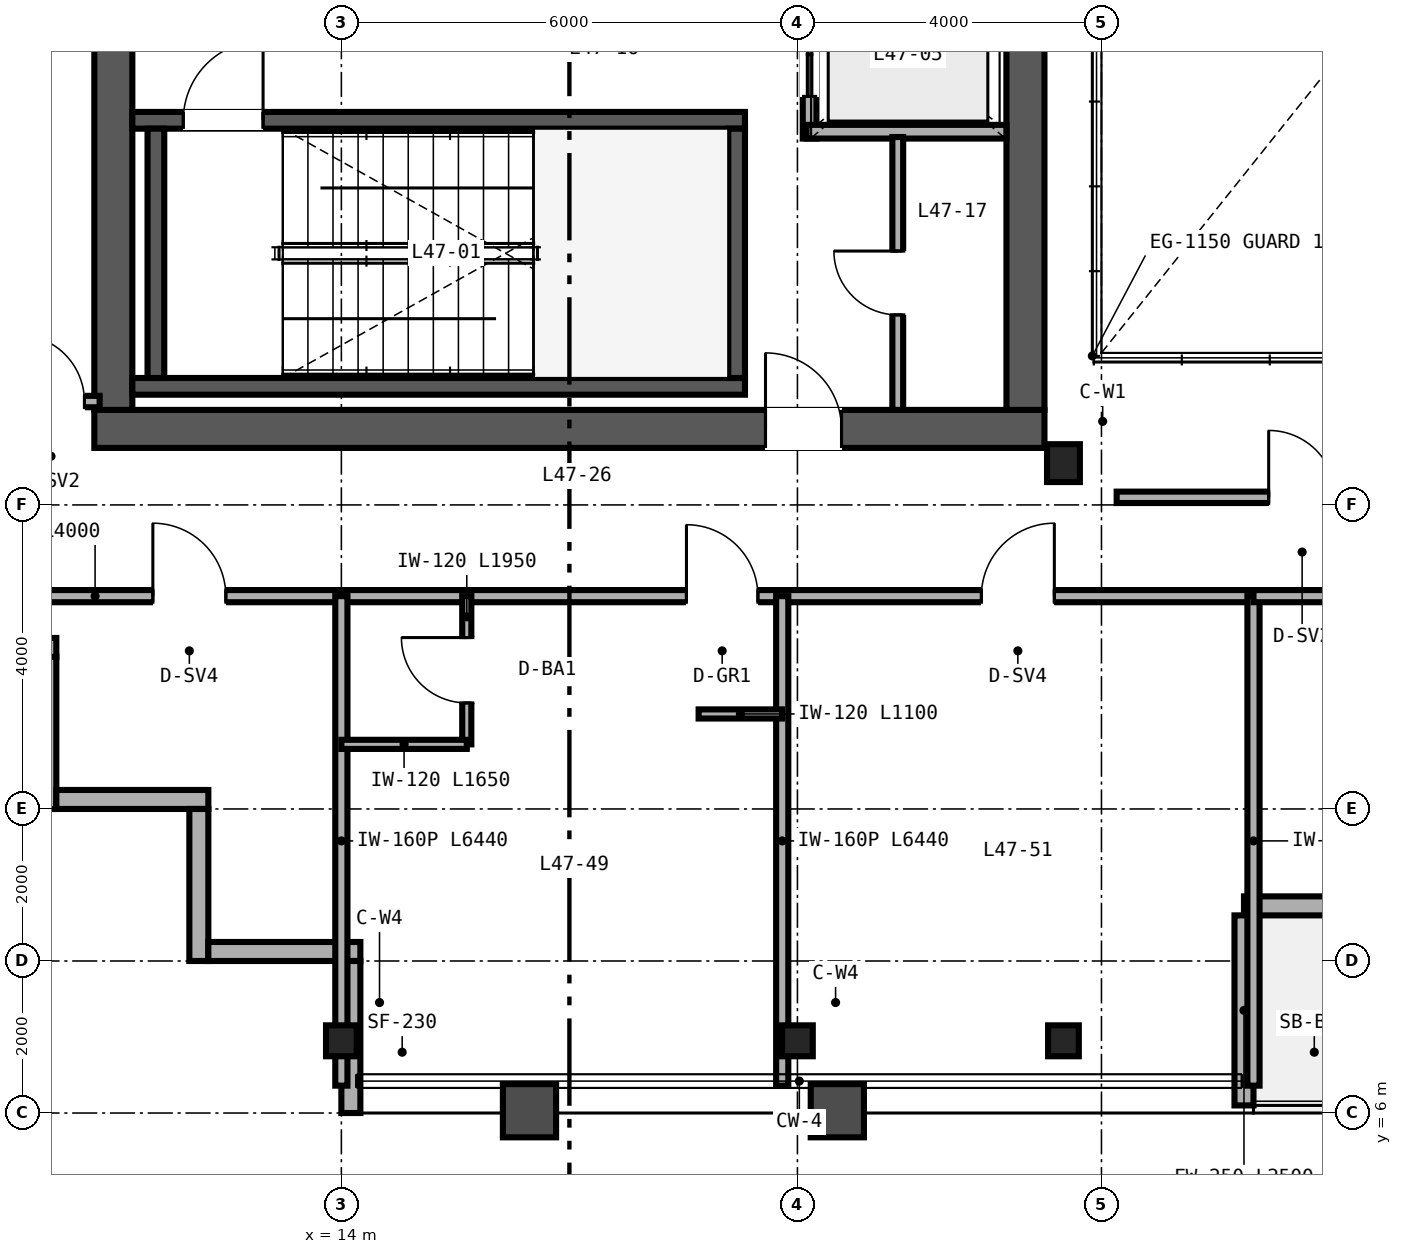
"""IFC4 building model, lengths in metres.
Left out: names, types, materials, properties, quantities, classifications, styles, units other than length and angle.
Written with IfcOpenShell. Run it as: python <this file> out.ifc"""

import sys

from ifc_helpers import new_model, si_unit, direction, frame, frame_2d, origin, origin_2d, place, context, subcontext, project, spatial, rectangle, i_section, extrude, source, transform, mapped, element, fill, save


model = new_model("IFC4")
c1 = context("Model", 3, precision=1e-05, world=origin(), true_north=direction((0.0, 1.0)))
c2 = subcontext(c1, "Body", "Model", "MODEL_VIEW")
j1 = project(units=[si_unit("LENGTHUNIT", "METRE"), si_unit("PLANEANGLEUNIT", "RADIAN")], contexts=[c1])
p1 = place(None, origin())
s1 = spatial("IfcSite", under=j1, at=p1, CompositionType="ELEMENT")
p2 = place(p1, origin())
s2 = spatial("IfcBuilding", under=s1, at=p2, CompositionType="ELEMENT")
p3 = place(p2, frame((0.0, 0.0, 188.4)))
s3 = spatial("IfcBuildingStorey", under=s2, at=p3, CompositionType="ELEMENT", Elevation=188.4)
p4 = place(p3, frame((10.75, 15.0, 0.0), z_axis=(0.0, 0.0, 1.0), x_axis=(1.0, 0.0, 0.0)))
e1 = element("IfcWall", 1, at=p4, inside=s3, PredefinedType="SHEAR", context=c2, shape_type="SweptSolid", body=[
    extrude(rectangle(XDim=12.5, YDim=0.5, at=frame_2d((6.25, 0.0))), origin(), (0.0, 0.0, 1.0), 3.37),
])
p5 = place(p4, frame((8.83, 0.0, 0.0)))
e2 = element("IfcOpeningElement", 2, at=p5, cuts=e1, PredefinedType="OPENING", context=c2, shape_type="SweptSolid", body=[
    extrude(rectangle(XDim=1.0, YDim=2.15, at=frame_2d((0.5, 1.075))), frame((0.0, 0.26, 0.0), z_axis=(0.0, -1.0, 0.0), x_axis=(1.0, 0.0, 0.0)), (0.0, 0.0, 1.0), 0.52),
])
for number, where, z_axis, x_axis in (
    (3, (11.0, 15.25, 0.0), (0.0, 0.0, 1.0), (0.0, 1.0, 0.0)),
    (4, (23.0, 15.25, 0.0), (0.0, 0.0, 1.0), (0.0, 1.0, 0.0)),
):
    element("IfcWall", number, at=place(p3, frame(where, z_axis=z_axis, x_axis=x_axis)), inside=s3, PredefinedType="SHEAR", context=c2, shape_type="SweptSolid", body=[
        extrude(rectangle(XDim=21.5, YDim=0.5, at=frame_2d((10.75, 0.0))), origin(), (0.0, 0.0, 1.0), 3.37),
    ])
p6 = place(p3, frame((11.25, 15.56, 0.0), z_axis=(0.0, 0.0, 1.0), x_axis=(1.0, 0.0, 0.0)))
e5 = element("IfcWall", 5, at=p6, inside=s3, PredefinedType="SHEAR", context=c2, shape_type="SweptSolid", body=[
    extrude(rectangle(XDim=8.06, YDim=0.22, at=frame_2d((4.03, 0.0))), origin(), (0.0, 0.0, 1.0), 3.4),
])
p7 = place(p3, frame((11.25, 19.06, 0.0), z_axis=(0.0, 0.0, 1.0), x_axis=(1.0, 0.0, 0.0)))
e6 = element("IfcWall", 6, at=p7, inside=s3, PredefinedType="SHEAR", context=c2, shape_type="SweptSolid", body=[
    extrude(rectangle(XDim=8.06, YDim=0.22, at=frame_2d((4.03, 0.0))), origin(), (0.0, 0.0, 1.0), 3.4),
])
p8 = place(p7, frame((0.67, 0.0, 0.0)))
e7 = element("IfcOpeningElement", 7, at=p8, cuts=e6, PredefinedType="OPENING", context=c2, shape_type="SweptSolid", body=[
    extrude(rectangle(XDim=1.05, YDim=2.15, at=frame_2d((0.525, 1.075))), frame((0.0, 0.12, 0.0), z_axis=(0.0, -1.0, 0.0), x_axis=(1.0, 0.0, 0.0)), (0.0, 0.0, 1.0), 0.24),
])
for number, where, z_axis, x_axis in (
    (8, (11.56, 15.67, 0.0), (0.0, 0.0, 1.0), (0.0, 1.0, 0.0)),
    (9, (19.2, 15.67, 0.0), (0.0, 0.0, 1.0), (0.0, 1.0, 0.0)),
):
    element("IfcWall", number, at=place(p3, frame(where, z_axis=z_axis, x_axis=x_axis)), inside=s3, PredefinedType="SHEAR", context=c2, shape_type="SweptSolid", body=[
        extrude(rectangle(XDim=3.28, YDim=0.22, at=frame_2d((1.64, 0.0))), origin(), (0.0, 0.0, 1.0), 3.4),
    ])
m1 = source(origin(), c2, "Body", "SweptSolid", [
    extrude(i_section(OverallWidth=0.432, OverallDepth=0.498, WebThickness=0.056, FlangeThickness=0.089, FilletRadius=0.025, at=origin_2d()), origin(), (0.0, 0.0, 1.0), 3.37),
])
p9 = place(p3, frame((23.5, 14.55, 0.0), z_axis=(0.0, 0.0, 1.0), x_axis=(1.0, 0.0, 0.0)))
e10 = element("IfcColumn", 10, at=p9, inside=s3, PredefinedType="COLUMN", context=c2, shape_type="MappedRepresentation", body=[
    mapped(m1, transform((0.0, 0.0, 0.0), scale=1.0)),
])
m2 = source(origin(), c2, "Body", "SweptSolid", [
    extrude(i_section(OverallWidth=0.404, OverallDepth=0.407, WebThickness=0.027, FlangeThickness=0.044, FilletRadius=0.025, at=origin_2d()), origin(), (0.0, 0.0, 1.0), 3.37),
])
for number, where, z_axis, x_axis in (
    (11, (14.0, 6.95, 0.0), (0.0, 0.0, 1.0), (1.0, 0.0, 0.0)),
    (12, (20.0, 6.95, 0.0), (0.0, 0.0, 1.0), (1.0, 0.0, 0.0)),
    (13, (23.5, 6.95, 0.0), (0.0, 0.0, 1.0), (1.0, 0.0, 0.0)),
):
    element("IfcColumn", number, at=place(p3, frame(where, z_axis=z_axis, x_axis=x_axis)), inside=s3, PredefinedType="COLUMN", context=c2, shape_type="MappedRepresentation", body=[
        mapped(m2, transform((0.0, 0.0, 0.0), scale=1.0)),
    ])
p10 = place(p3, frame((8.0, 12.125, 0.0), z_axis=(0.0, 0.0, 1.0), x_axis=(1.0, 0.0, 0.0)))
e14 = element("IfcWall", 14, at=p10, inside=s3, PredefinedType="SOLIDWALL", context=c2, shape_type="SweptSolid", body=[
    extrude(rectangle(XDim=2.25, YDim=0.25, at=frame_2d((1.125, 0.0))), origin(), (0.0, 0.0, 1.0), 3.37),
])
for number, where, z_axis, x_axis in (
    (15, (10.125, 12.0, 0.0), (0.0, 0.0, 1.0), (0.0, -1.0, 0.0)),
    (16, (10.25, 10.125, 0.0), (0.0, 0.0, 1.0), (1.0, 0.0, 0.0)),
    (17, (12.125, 10.0, 0.0), (0.0, 0.0, 1.0), (0.0, -1.0, 0.0)),
    (18, (12.25, 8.125, 0.0), (0.0, 0.0, 1.0), (1.0, 0.0, 0.0)),
):
    element("IfcWall", number, at=place(p3, frame(where, z_axis=z_axis, x_axis=x_axis)), inside=s3, PredefinedType="SOLIDWALL", context=c2, shape_type="SweptSolid", body=[
        extrude(rectangle(XDim=2.0, YDim=0.25, at=frame_2d((1.0, 0.0))), origin(), (0.0, 0.0, 1.0), 3.37),
    ])
p11 = place(p3, frame((14.125, 8.0, 0.0), z_axis=(0.0, 0.0, 1.0), x_axis=(0.0, -1.0, 0.0)))
e19 = element("IfcWall", 19, at=p11, inside=s3, PredefinedType="SOLIDWALL", context=c2, shape_type="SweptSolid", body=[
    extrude(rectangle(XDim=2.0, YDim=0.25, at=frame_2d((1.0, 0.0))), origin(), (0.0, 0.0, 1.0), 2.677),
])
p12 = place(p3, frame((25.875, 8.725, 0.0), z_axis=(0.0, 0.0, 1.0), x_axis=(1.0, 0.0, 0.0)))
e20 = element("IfcWall", 20, at=p12, inside=s3, PredefinedType="SOLIDWALL", context=c2, shape_type="SweptSolid", body=[
    extrude(rectangle(XDim=12.25, YDim=0.25, at=frame_2d((6.125, 0.0))), origin(), (0.0, 0.0, 1.0), 3.37),
])
p13 = place(p12, frame((5.6, 0.0, 0.0)))
e21 = element("IfcOpeningElement", 21, at=p13, cuts=e20, PredefinedType="OPENING", context=c2, shape_type="SweptSolid", body=[
    extrude(rectangle(XDim=1.05, YDim=2.15, at=frame_2d((0.525, 1.075))), frame((0.0, 0.135, 0.0), z_axis=(0.0, -1.0, 0.0), x_axis=(1.0, 0.0, 0.0)), (0.0, 0.0, 1.0), 0.27),
])
p14 = place(p3, frame((25.875, 6.1, 0.0), z_axis=(0.0, 0.0, 1.0), x_axis=(0.0, 1.0, 0.0)))
e22 = element("IfcWall", 22, at=p14, inside=s3, PredefinedType="SOLIDWALL", context=c2, shape_type="SweptSolid", body=[
    extrude(rectangle(XDim=2.5, YDim=0.25, at=frame_2d((1.25, 0.0))), origin(), (0.0, 0.0, 1.0), 2.443),
])
p15 = place(p3, frame((20.16, 18.82, 0.0), z_axis=(0.0, 0.0, 1.0), x_axis=(0.0, 1.0, 0.0)))
e23 = element("IfcWall", 23, at=p15, inside=s3, PredefinedType="SOLIDWALL", context=c2, shape_type="SweptSolid", body=[
    extrude(rectangle(XDim=6.32, YDim=0.18, at=frame_2d((3.16, 0.0))), origin(), (0.0, 0.0, 1.0), 2.47),
])
p16 = place(p15, frame((0.555, 0.0, 0.0)))
e24 = element("IfcOpeningElement", 24, at=p16, cuts=e23, PredefinedType="OPENING", context=c2, shape_type="SweptSolid", body=[
    extrude(rectangle(XDim=1.1, YDim=2.2, at=frame_2d((0.55, 1.1))), frame((0.0, 0.1, 0.0), z_axis=(0.0, -1.0, 0.0), x_axis=(1.0, 0.0, 0.0)), (0.0, 0.0, 1.0), 0.2),
])
p17 = place(p15, frame((2.635, 0.0, 0.0)))
e25 = element("IfcOpeningElement", 25, at=p17, cuts=e23, PredefinedType="OPENING", context=c2, shape_type="SweptSolid", body=[
    extrude(rectangle(XDim=1.1, YDim=2.2, at=frame_2d((0.55, 1.1))), frame((0.0, 0.1, 0.0), z_axis=(0.0, -1.0, 0.0), x_axis=(1.0, 0.0, 0.0)), (0.0, 0.0, 1.0), 0.2),
])
p18 = place(p15, frame((4.69, 0.0, 0.0)))
e26 = element("IfcOpeningElement", 26, at=p18, cuts=e23, PredefinedType="OPENING", context=c2, shape_type="SweptSolid", body=[
    extrude(rectangle(XDim=1.1, YDim=2.2, at=frame_2d((0.55, 1.1))), frame((0.0, 0.1, 0.0), z_axis=(0.0, -1.0, 0.0), x_axis=(1.0, 0.0, 0.0)), (0.0, 0.0, 1.0), 0.2),
])
p19 = place(p3, frame((20.12, 18.91, 0.0), z_axis=(0.0, 0.0, 1.0), x_axis=(1.0, 0.0, 0.0)))
e27 = element("IfcWall", 27, at=p19, inside=s3, PredefinedType="SOLIDWALL", context=c2, shape_type="SweptSolid", body=[
    extrude(rectangle(XDim=2.63, YDim=0.18, at=frame_2d((1.315, 0.0))), origin(), (0.0, 0.0, 1.0), 3.37),
])
p20 = place(p3, frame((21.32, 15.25, 0.0), z_axis=(0.0, 0.0, 1.0), x_axis=(0.0, 1.0, 0.0)))
e28 = element("IfcWall", 28, at=p20, inside=s3, PredefinedType="PARTITIONING", context=c2, shape_type="SweptSolid", body=[
    extrude(rectangle(XDim=3.59, YDim=0.142, at=frame_2d((1.795, 0.0))), origin(), (0.0, 0.0, 1.0), 3.37),
])
p21 = place(p20, frame((1.25, 0.0, 0.0)))
e29 = element("IfcOpeningElement", 29, at=p21, cuts=e28, PredefinedType="OPENING", context=c2, shape_type="SweptSolid", body=[
    extrude(rectangle(XDim=0.84, YDim=2.1, at=frame_2d((0.42, 1.05))), frame((0.0, 0.081, 0.0), z_axis=(0.0, -1.0, 0.0), x_axis=(1.0, 0.0, 0.0)), (0.0, 0.0, 1.0), 0.162),
])
p22 = place(p3, frame((24.2, 14.1, 0.0), z_axis=(0.0, 0.0, 1.0), x_axis=(1.0, 0.0, 0.0)))
e30 = element("IfcWall", 30, at=p22, inside=s3, PredefinedType="PARTITIONING", context=c2, shape_type="SweptSolid", body=[
    extrude(rectangle(XDim=15.6, YDim=0.15, at=frame_2d((7.8, 0.0))), origin(), (0.0, 0.0, 1.0), 3.37),
])
p23 = place(p22, frame((2.0, 0.0, 0.0)))
e31 = element("IfcOpeningElement", 31, at=p23, cuts=e30, PredefinedType="OPENING", context=c2, shape_type="SweptSolid", body=[
    extrude(rectangle(XDim=0.88, YDim=2.15, at=frame_2d((0.44, 1.075))), frame((0.0, 0.085, 0.0), z_axis=(0.0, -1.0, 0.0), x_axis=(1.0, 0.0, 0.0)), (0.0, 0.0, 1.0), 0.17),
])
p24 = place(p22, frame((7.25, 0.0, 0.0)))
e32 = element("IfcOpeningElement", 32, at=p24, cuts=e30, PredefinedType="OPENING", context=c2, shape_type="SweptSolid", body=[
    extrude(rectangle(XDim=0.88, YDim=2.15, at=frame_2d((0.44, 1.075))), frame((0.0, 0.085, 0.0), z_axis=(0.0, -1.0, 0.0), x_axis=(1.0, 0.0, 0.0)), (0.0, 0.0, 1.0), 0.17),
])
p25 = place(p22, frame((12.5, 0.0, 0.0)))
e33 = element("IfcOpeningElement", 33, at=p25, cuts=e30, PredefinedType="OPENING", context=c2, shape_type="SweptSolid", body=[
    extrude(rectangle(XDim=0.88, YDim=2.15, at=frame_2d((0.44, 1.075))), frame((0.0, 0.085, 0.0), z_axis=(0.0, -1.0, 0.0), x_axis=(1.0, 0.0, 0.0)), (0.0, 0.0, 1.0), 0.17),
])
p26 = place(p3, frame((8.16, 15.36, 0.0), z_axis=(0.0, 0.0, 1.0), x_axis=(1.0, 0.0, 0.0)))
e34 = element("IfcWall", 34, at=p26, inside=s3, PredefinedType="PARTITIONING", context=c2, shape_type="SweptSolid", body=[
    extrude(rectangle(XDim=2.66, YDim=0.15, at=frame_2d((1.33, 0.0))), origin(), (0.0, 0.0, 1.0), 2.591),
])
p27 = place(p26, frame((1.58, 0.0, 0.0)))
e35 = element("IfcOpeningElement", 35, at=p27, cuts=e34, PredefinedType="OPENING", context=c2, shape_type="SweptSolid", body=[
    extrude(rectangle(XDim=0.88, YDim=2.15, at=frame_2d((0.44, 1.075))), frame((0.0, 0.085, 0.0), z_axis=(0.0, -1.0, 0.0), x_axis=(1.0, 0.0, 0.0)), (0.0, 0.0, 1.0), 0.17),
])
p28 = place(p3, frame((10.0, 12.8, 0.0), z_axis=(0.0, 0.0, 1.0), x_axis=(1.0, 0.0, 0.0)))
e36 = element("IfcWall", 36, at=p28, inside=s3, PredefinedType="PARTITIONING", context=c2, shape_type="SweptSolid", body=[
    extrude(rectangle(XDim=4.0, YDim=0.16, at=frame_2d((2.0, 0.0))), origin(), (0.0, 0.0, 1.0), 3.37),
])
p29 = place(p28, frame((1.52, 0.0, 0.0)))
e37 = element("IfcOpeningElement", 37, at=p29, cuts=e36, PredefinedType="OPENING", context=c2, shape_type="SweptSolid", body=[
    extrude(rectangle(XDim=0.96, YDim=2.15, at=frame_2d((0.48, 1.075))), frame((0.0, 0.09, 0.0), z_axis=(0.0, -1.0, 0.0), x_axis=(1.0, 0.0, 0.0)), (0.0, 0.0, 1.0), 0.18),
])
p30 = place(p3, frame((14.0, 12.8, 0.0), z_axis=(0.0, 0.0, 1.0), x_axis=(1.0, 0.0, 0.0)))
e38 = element("IfcWall", 38, at=p30, inside=s3, PredefinedType="PARTITIONING", context=c2, shape_type="SweptSolid", body=[
    extrude(rectangle(XDim=12.0, YDim=0.16, at=frame_2d((6.0, 0.0))), origin(), (0.0, 0.0, 1.0), 2.913),
])
p31 = place(p30, frame((4.54, 0.0, 0.0)))
e39 = element("IfcOpeningElement", 39, at=p31, cuts=e38, PredefinedType="OPENING", context=c2, shape_type="SweptSolid", body=[
    extrude(rectangle(XDim=0.94, YDim=2.15, at=frame_2d((0.47, 1.075))), frame((0.0, 0.09, 0.0), z_axis=(0.0, -1.0, 0.0), x_axis=(1.0, 0.0, 0.0)), (0.0, 0.0, 1.0), 0.18),
])
p32 = place(p30, frame((8.42, 0.0, 0.0)))
e40 = element("IfcOpeningElement", 40, at=p32, cuts=e38, PredefinedType="OPENING", context=c2, shape_type="SweptSolid", body=[
    extrude(rectangle(XDim=0.96, YDim=2.15, at=frame_2d((0.48, 1.075))), frame((0.0, 0.09, 0.0), z_axis=(0.0, -1.0, 0.0), x_axis=(1.0, 0.0, 0.0)), (0.0, 0.0, 1.0), 0.18),
])
p33 = place(p3, frame((14.0, 6.36, 0.0), z_axis=(0.0, 0.0, 1.0), x_axis=(0.0, 1.0, 0.0)))
e41 = element("IfcWall", 41, at=p33, inside=s3, PredefinedType="PARTITIONING", context=c2, shape_type="SweptSolid", body=[
    extrude(rectangle(XDim=6.44, YDim=0.16, at=frame_2d((3.22, 0.0))), origin(), (0.0, 0.0, 1.0), 2.677),
])
p34 = place(p3, frame((26.0, 6.36, 0.0), z_axis=(0.0, 0.0, 1.0), x_axis=(0.0, 1.0, 0.0)))
e42 = element("IfcWall", 42, at=p34, inside=s3, PredefinedType="PARTITIONING", context=c2, shape_type="SweptSolid", body=[
    extrude(rectangle(XDim=6.44, YDim=0.16, at=frame_2d((3.22, 0.0))), origin(), (0.0, 0.0, 1.0), 2.443),
])
p35 = place(p3, frame((19.8, 6.36, 0.0), z_axis=(0.0, 0.0, 1.0), x_axis=(0.0, 1.0, 0.0)))
e43 = element("IfcWall", 43, at=p35, inside=s3, PredefinedType="PARTITIONING", context=c2, shape_type="SweptSolid", body=[
    extrude(rectangle(XDim=6.44, YDim=0.16, at=frame_2d((3.22, 0.0))), origin(), (0.0, 0.0, 1.0), 2.677),
])
p36 = place(p3, frame((15.65, 10.85, 0.0), z_axis=(0.0, 0.0, 1.0), x_axis=(0.0, 1.0, 0.0)))
e44 = element("IfcWall", 44, at=p36, inside=s3, PredefinedType="PARTITIONING", context=c2, shape_type="SweptSolid", body=[
    extrude(rectangle(XDim=1.95, YDim=0.12, at=frame_2d((0.975, 0.0))), origin(), (0.0, 0.0, 1.0), 3.37),
])
p37 = place(p36, frame((0.545, 0.0, 0.0)))
e45 = element("IfcOpeningElement", 45, at=p37, cuts=e44, PredefinedType="OPENING", context=c2, shape_type="SweptSolid", body=[
    extrude(rectangle(XDim=0.86, YDim=2.1, at=frame_2d((0.43, 1.05))), frame((0.0, 0.07, 0.0), z_axis=(0.0, -1.0, 0.0), x_axis=(1.0, 0.0, 0.0)), (0.0, 0.0, 1.0), 0.14),
])
p38 = place(p3, frame((14.0, 10.85, 0.0), z_axis=(0.0, 0.0, 1.0), x_axis=(1.0, 0.0, 0.0)))
e46 = element("IfcWall", 46, at=p38, inside=s3, PredefinedType="PARTITIONING", context=c2, shape_type="SweptSolid", body=[
    extrude(rectangle(XDim=1.65, YDim=0.12, at=frame_2d((0.825, 0.0))), origin(), (0.0, 0.0, 1.0), 3.37),
])
p39 = place(p3, frame((18.7, 11.25, 0.0), z_axis=(0.0, 0.0, 1.0), x_axis=(1.0, 0.0, 0.0)))
e47 = element("IfcWall", 47, at=p39, inside=s3, PredefinedType="PARTITIONING", context=c2, shape_type="SweptSolid", body=[
    extrude(rectangle(XDim=1.1, YDim=0.12, at=frame_2d((0.55, 0.0))), origin(), (0.0, 0.0, 1.0), 3.37),
])
p40 = place(p3, frame((26.0, 12.8, 0.0), z_axis=(0.0, 0.0, 1.0), x_axis=(1.0, 0.0, 0.0)))
e48 = element("IfcWall", 48, at=p40, inside=s3, PredefinedType="PARTITIONING", context=c2, shape_type="SweptSolid", body=[
    extrude(rectangle(XDim=12.0, YDim=0.16, at=frame_2d((6.0, 0.0))), origin(), (0.0, 0.0, 1.0), 3.37),
])
p41 = place(p40, frame((5.2, 0.0, 0.0)))
e49 = element("IfcOpeningElement", 49, at=p41, cuts=e48, PredefinedType="OPENING", context=c2, shape_type="SweptSolid", body=[
    extrude(rectangle(XDim=0.96, YDim=2.15, at=frame_2d((0.48, 1.075))), frame((0.0, 0.09, 0.0), z_axis=(0.0, -1.0, 0.0), x_axis=(1.0, 0.0, 0.0)), (0.0, 0.0, 1.0), 0.18),
])
m3 = source(origin(), c2, "Body", "SweptSolid", [
    extrude(rectangle(XDim=1.05, YDim=2.15, at=frame_2d((0.525, 1.075))), frame((0.0, 0.025, 0.0), z_axis=(0.0, -1.0, 0.0), x_axis=(1.0, 0.0, 0.0)), (0.0, 0.0, 1.0), 0.05),
])
p42 = place(p8, origin())
e50 = element("IfcDoor", 50, at=p42, inside=s3, OperationType="SINGLE_SWING_RIGHT", PredefinedType="DOOR", context=c2, shape_type="MappedRepresentation", body=[
    mapped(m3, transform((0.0, 0.0, 0.0), scale=1.0)),
])
fill(e7, e50)
m4 = source(origin(), c2, "Body", "SweptSolid", [
    extrude(rectangle(XDim=1.1, YDim=2.2, at=frame_2d((0.55, 1.1))), frame((0.0, 0.025, 0.0), z_axis=(0.0, -1.0, 0.0), x_axis=(1.0, 0.0, 0.0)), (0.0, 0.0, 1.0), 0.05),
])
p43 = place(p16, origin())
e51 = element("IfcDoor", 51, at=p43, inside=s3, OperationType="DOUBLE_DOOR_SLIDING", PredefinedType="DOOR", context=c2, shape_type="MappedRepresentation", body=[
    mapped(m4, transform((0.0, 0.0, 0.0), scale=1.0)),
])
fill(e24, e51)
m5 = source(origin(), c2, "Body", "SweptSolid", [
    extrude(rectangle(XDim=0.84, YDim=2.1, at=frame_2d((0.42, 1.05))), frame((0.0, 0.025, 0.0), z_axis=(0.0, -1.0, 0.0), x_axis=(1.0, 0.0, 0.0)), (0.0, 0.0, 1.0), 0.05),
])
p44 = place(p21, origin())
e52 = element("IfcDoor", 52, at=p44, inside=s3, OperationType="SINGLE_SWING_RIGHT", PredefinedType="DOOR", context=c2, shape_type="MappedRepresentation", body=[
    mapped(m5, transform((0.0, 0.0, 0.0), scale=1.0)),
])
fill(e29, e52)
m6 = source(origin(), c2, "Body", "SweptSolid", [
    extrude(rectangle(XDim=1.0, YDim=2.15, at=frame_2d((0.5, 1.075))), frame((0.0, 0.025, 0.0), z_axis=(0.0, -1.0, 0.0), x_axis=(1.0, 0.0, 0.0)), (0.0, 0.0, 1.0), 0.05),
])
p45 = place(p5, origin())
e53 = element("IfcDoor", 53, at=p45, inside=s3, OperationType="SINGLE_SWING_LEFT", PredefinedType="DOOR", context=c2, shape_type="MappedRepresentation", body=[
    mapped(m6, transform((0.0, 0.0, 0.0), scale=1.0)),
])
fill(e2, e53)
m7 = source(origin(), c2, "Body", "SweptSolid", [
    extrude(rectangle(XDim=0.88, YDim=2.15, at=frame_2d((0.44, 1.075))), frame((0.0, 0.025, 0.0), z_axis=(0.0, -1.0, 0.0), x_axis=(1.0, 0.0, 0.0)), (0.0, 0.0, 1.0), 0.05),
])
p46 = place(p23, origin())
e54 = element("IfcDoor", 54, at=p46, inside=s3, OperationType="SINGLE_SWING_LEFT", PredefinedType="DOOR", context=c2, shape_type="MappedRepresentation", body=[
    mapped(m7, transform((0.0, 0.0, 0.0), scale=1.0)),
])
fill(e31, e54)
p47 = place(p27, origin())
e55 = element("IfcDoor", 55, at=p47, inside=s3, OperationType="SINGLE_SWING_LEFT", PredefinedType="DOOR", context=c2, shape_type="MappedRepresentation", body=[
    mapped(m7, transform((0.0, 0.0, 0.0), scale=1.0)),
])
fill(e35, e55)
m8 = source(origin(), c2, "Body", "SweptSolid", [
    extrude(rectangle(XDim=0.96, YDim=2.15, at=frame_2d((0.48, 1.075))), frame((0.0, 0.025, 0.0), z_axis=(0.0, -1.0, 0.0), x_axis=(1.0, 0.0, 0.0)), (0.0, 0.0, 1.0), 0.05),
])
p48 = place(p29, origin())
e56 = element("IfcDoor", 56, at=p48, inside=s3, OperationType="SINGLE_SWING_LEFT", PredefinedType="DOOR", context=c2, shape_type="MappedRepresentation", body=[
    mapped(m8, transform((0.0, 0.0, 0.0), scale=1.0)),
])
fill(e37, e56)
m9 = source(origin(), c2, "Body", "SweptSolid", [
    extrude(rectangle(XDim=0.86, YDim=2.1, at=frame_2d((0.43, 1.05))), frame((0.0, 0.025, 0.0), z_axis=(0.0, -1.0, 0.0), x_axis=(1.0, 0.0, 0.0)), (0.0, 0.0, 1.0), 0.05),
])
p49 = place(p37, origin())
e57 = element("IfcDoor", 57, at=p49, inside=s3, OperationType="SINGLE_SWING_RIGHT", PredefinedType="DOOR", context=c2, shape_type="MappedRepresentation", body=[
    mapped(m9, transform((0.0, 0.0, 0.0), scale=1.0)),
])
fill(e45, e57)
m10 = source(origin(), c2, "Body", "SweptSolid", [
    extrude(rectangle(XDim=0.94, YDim=2.15, at=frame_2d((0.47, 1.075))), frame((0.0, 0.025, 0.0), z_axis=(0.0, -1.0, 0.0), x_axis=(1.0, 0.0, 0.0)), (0.0, 0.0, 1.0), 0.05),
])
p50 = place(p31, origin())
e58 = element("IfcDoor", 58, at=p50, inside=s3, OperationType="SINGLE_SWING_LEFT", PredefinedType="DOOR", context=c2, shape_type="MappedRepresentation", body=[
    mapped(m10, transform((0.0, 0.0, 0.0), scale=1.0)),
])
fill(e39, e58)
p51 = place(p32, origin())
e59 = element("IfcDoor", 59, at=p51, inside=s3, OperationType="SINGLE_SWING_RIGHT", PredefinedType="DOOR", context=c2, shape_type="MappedRepresentation", body=[
    mapped(m8, transform((0.0, 0.0, 0.0), scale=1.0)),
])
fill(e40, e59)
save(model, sys.argv[1])
